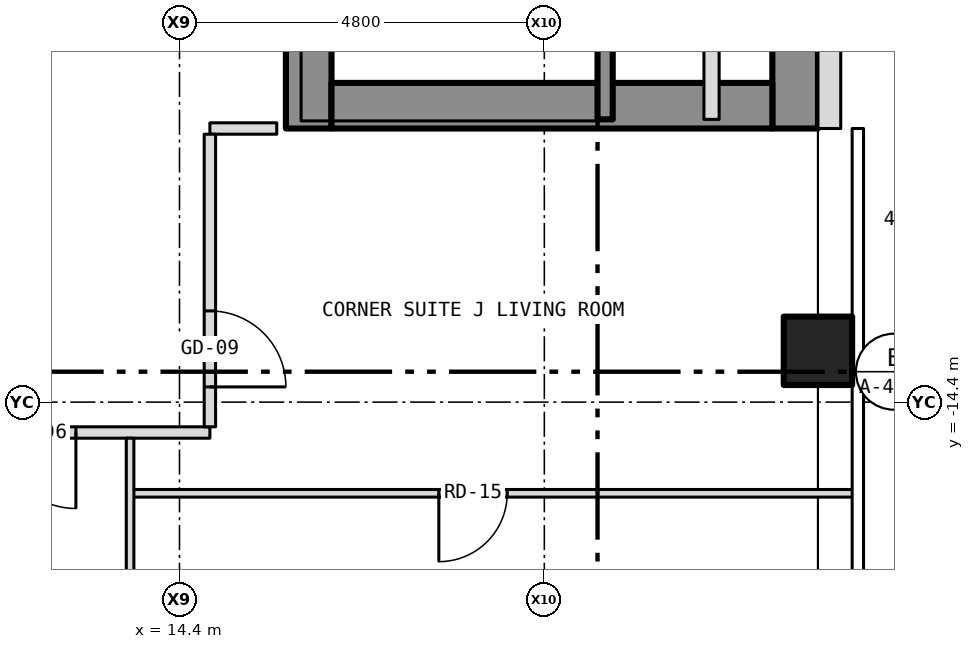
"""IFC4 building model, lengths in metres.
Left out: names, types, materials, properties, quantities, classifications, styles, units other than length and angle.
Written with IfcOpenShell. Run it as: python <this file> out.ifc"""

import sys

from ifc_helpers import new_model, si_unit, direction, frame, frame_2d, origin, origin_2d, place, context, subcontext, project, spatial, rectangle, hollow_rectangle, extrude, element, fill, save


model = new_model("IFC4")
c1 = context("Model", 3, precision=1e-05, world=origin(), true_north=direction((0.0, 1.0)))
c2 = subcontext(c1, "Body", "Model", "MODEL_VIEW")
j1 = project(units=[si_unit("LENGTHUNIT", "METRE"), si_unit("PLANEANGLEUNIT", "RADIAN")], contexts=[c1])
p1 = place(None, origin())
s1 = spatial("IfcSite", under=j1, at=p1, CompositionType="ELEMENT")
p2 = place(p1, origin())
s2 = spatial("IfcBuilding", under=s1, at=p2, CompositionType="ELEMENT")
p3 = place(p2, frame((0.0, 0.0, 103.0)))
s3 = spatial("IfcBuildingStorey", under=s2, at=p3, CompositionType="ELEMENT", Elevation=103.0)
p4 = place(p3, frame((22.8, -13.725, -0.15), z_axis=(0.0, 0.0, 1.0), x_axis=(1.0, 0.0, 0.0)))
e1 = element("IfcColumn", 1, at=p4, inside=s3, PredefinedType="COLUMN", context=c2, shape_type="SweptSolid", body=[
    extrude(hollow_rectangle(XDim=0.9, YDim=0.9, WallThickness=0.05, at=origin_2d()), origin(), (0.0, 0.0, 1.0), 3.5),
])
p5 = place(p3, frame((16.1, -10.8, 0.0), z_axis=(0.0, 0.0, 1.0), x_axis=(0.0, 1.0, 0.0)))
e2 = element("IfcWall", 2, at=p5, inside=s3, PredefinedType="SHEAR", context=c2, shape_type="SweptSolid", body=[
    extrude(rectangle(XDim=21.6, YDim=0.6, at=frame_2d((10.8, 0.0))), origin(), (0.0, 0.0, 1.0), 3.25),
])
p6 = place(p5, frame((9.4, 0.0, 0.0)))
e3 = element("IfcOpeningElement", 3, at=p6, cuts=e2, PredefinedType="OPENING", context=c2, shape_type="SweptSolid", body=[
    extrude(rectangle(XDim=1.1, YDim=2.1, at=frame_2d((0.55, 1.05))), frame((0.0, 0.312, 0.0), z_axis=(0.0, -1.0, 0.0), x_axis=(1.0, 0.0, 0.0)), (0.0, 0.0, 1.0), 0.624),
])
p7 = place(p5, frame((11.5, 0.0, 0.0)))
e4 = element("IfcOpeningElement", 4, at=p7, cuts=e2, PredefinedType="OPENING", context=c2, shape_type="SweptSolid", body=[
    extrude(rectangle(XDim=1.1, YDim=2.1, at=frame_2d((0.55, 1.05))), frame((0.0, 0.312, 0.0), z_axis=(0.0, -1.0, 0.0), x_axis=(1.0, 0.0, 0.0)), (0.0, 0.0, 1.0), 0.624),
])
p8 = place(p5, frame((13.6, 0.0, 0.0)))
e5 = element("IfcOpeningElement", 5, at=p8, cuts=e2, PredefinedType="OPENING", context=c2, shape_type="SweptSolid", body=[
    extrude(rectangle(XDim=1.1, YDim=2.1, at=frame_2d((0.55, 1.05))), frame((0.0, 0.312, 0.0), z_axis=(0.0, -1.0, 0.0), x_axis=(1.0, 0.0, 0.0)), (0.0, 0.0, 1.0), 0.624),
])
p9 = place(p5, frame((15.7, 0.0, 0.0)))
e6 = element("IfcOpeningElement", 6, at=p9, cuts=e2, PredefinedType="OPENING", context=c2, shape_type="SweptSolid", body=[
    extrude(rectangle(XDim=1.1, YDim=2.1, at=frame_2d((0.55, 1.05))), frame((0.0, 0.312, 0.0), z_axis=(0.0, -1.0, 0.0), x_axis=(1.0, 0.0, 0.0)), (0.0, 0.0, 1.0), 0.624),
])
p10 = place(p5, frame((17.8, 0.0, 0.0)))
e7 = element("IfcOpeningElement", 7, at=p10, cuts=e2, PredefinedType="OPENING", context=c2, shape_type="SweptSolid", body=[
    extrude(rectangle(XDim=1.1, YDim=2.1, at=frame_2d((0.55, 1.05))), frame((0.0, 0.312, 0.0), z_axis=(0.0, -1.0, 0.0), x_axis=(1.0, 0.0, 0.0)), (0.0, 0.0, 1.0), 0.624),
])
p11 = place(p5, frame((5.642, 0.0, 0.0)))
e8 = element("IfcOpeningElement", 8, at=p11, cuts=e2, PredefinedType="OPENING", context=c2, shape_type="SweptSolid", body=[
    extrude(rectangle(XDim=1.1, YDim=2.1, at=frame_2d((0.55, 1.05))), frame((0.0, 0.312, 0.0), z_axis=(0.0, -1.0, 0.0), x_axis=(1.0, 0.0, 0.0)), (0.0, 0.0, 1.0), 0.624),
])
p12 = place(p5, frame((7.5, 0.0, 0.0)))
e9 = element("IfcOpeningElement", 9, at=p12, cuts=e2, PredefinedType="OPENING", context=c2, shape_type="SweptSolid", body=[
    extrude(rectangle(XDim=1.1, YDim=2.1, at=frame_2d((0.55, 1.05))), frame((0.0, 0.312, 0.0), z_axis=(0.0, -1.0, 0.0), x_axis=(1.0, 0.0, 0.0)), (0.0, 0.0, 1.0), 0.624),
])
p13 = place(p3, frame((22.5, -10.8, 0.0), z_axis=(0.0, 0.0, 1.0), x_axis=(0.0, 1.0, 0.0)))
e10 = element("IfcWall", 10, at=p13, inside=s3, PredefinedType="SHEAR", context=c2, shape_type="SweptSolid", body=[
    extrude(rectangle(XDim=21.6, YDim=0.6, at=frame_2d((10.8, 0.0))), origin(), (0.0, 0.0, 1.0), 3.25),
])
p14 = place(p3, frame((16.4, -10.5, 0.0), z_axis=(0.0, 0.0, 1.0), x_axis=(1.0, 0.0, 0.0)))
e11 = element("IfcWall", 11, at=p14, inside=s3, PredefinedType="SHEAR", context=c2, shape_type="SweptSolid", body=[
    extrude(rectangle(XDim=5.8, YDim=0.6, at=frame_2d((2.9, 0.0))), origin(), (0.0, 0.0, 1.0), 3.25),
])
p15 = place(p3, frame((22.95, -10.8, 0.0), z_axis=(0.0, 0.0, 1.0), x_axis=(0.0, 1.0, 0.0)))
e12 = element("IfcWall", 12, at=p15, inside=s3, PredefinedType="SOLIDWALL", context=c2, shape_type="SweptSolid", body=[
    extrude(rectangle(XDim=21.6, YDim=0.3, at=frame_2d((10.8, 0.0))), origin(), (0.0, 0.0, 1.0), 3.5),
])
p16 = place(p15, frame((2.95, 0.0, 1.0)))
e13 = element("IfcOpeningElement", 13, at=p16, cuts=e12, PredefinedType="OPENING", context=c2, shape_type="SweptSolid", body=[
    extrude(rectangle(XDim=0.6, YDim=1.5, at=frame_2d((0.3, 0.75))), frame((0.0, 0.162, 0.0), z_axis=(0.0, -1.0, 0.0), x_axis=(1.0, 0.0, 0.0)), (0.0, 0.0, 1.0), 0.324),
])
p17 = place(p3, frame((13.75, -15.6, 0.0), z_axis=(0.0, 0.0, 1.0), x_axis=(1.0, 0.0, 0.0)))
e14 = element("IfcWall", 14, at=p17, inside=s3, PredefinedType="PARTITIONING", context=c2, shape_type="SweptSolid", body=[
    extrude(rectangle(XDim=9.53, YDim=0.1, at=frame_2d((4.765, 0.0))), origin(), (0.0, 0.0, 1.0), 3.35),
])
p18 = place(p17, frame((4.062, 0.0, 0.0)))
e15 = element("IfcOpeningElement", 15, at=p18, cuts=e14, PredefinedType="OPENING", context=c2, shape_type="SweptSolid", body=[
    extrude(rectangle(XDim=0.9, YDim=2.1, at=frame_2d((0.45, 1.05))), frame((0.0, 0.062, 0.0), z_axis=(0.0, -1.0, 0.0), x_axis=(1.0, 0.0, 0.0)), (0.0, 0.0, 1.0), 0.124),
])
p19 = place(p3, frame((-14.8, -14.8, 0.0), z_axis=(0.0, 0.0, 1.0), x_axis=(1.0, 0.0, 0.0)))
e16 = element("IfcWall", 16, at=p19, inside=s3, PredefinedType="PARTITIONING", context=c2, shape_type="SweptSolid", body=[
    extrude(rectangle(XDim=29.6, YDim=0.15, at=frame_2d((14.8, 0.0))), origin(), (0.0, 0.0, 1.0), 3.35),
])
p20 = place(p19, frame((2.634, 0.0, 0.0)))
e17 = element("IfcOpeningElement", 17, at=p20, cuts=e16, PredefinedType="OPENING", context=c2, shape_type="SweptSolid", body=[
    extrude(rectangle(XDim=1.0, YDim=2.1, at=frame_2d((0.5, 1.05))), frame((0.0, 0.087, 0.0), z_axis=(0.0, -1.0, 0.0), x_axis=(1.0, 0.0, 0.0)), (0.0, 0.0, 1.0), 0.174),
])
p21 = place(p19, frame((16.816, 0.0, 0.0)))
e18 = element("IfcOpeningElement", 18, at=p21, cuts=e16, PredefinedType="OPENING", context=c2, shape_type="SweptSolid", body=[
    extrude(rectangle(XDim=1.0, YDim=2.1, at=frame_2d((0.5, 1.05))), frame((0.0, 0.087, 0.0), z_axis=(0.0, -1.0, 0.0), x_axis=(1.0, 0.0, 0.0)), (0.0, 0.0, 1.0), 0.174),
])
p22 = place(p19, frame((22.263, 0.0, 0.0)))
e19 = element("IfcOpeningElement", 19, at=p22, cuts=e16, PredefinedType="OPENING", context=c2, shape_type="SweptSolid", body=[
    extrude(rectangle(XDim=1.0, YDim=2.1, at=frame_2d((0.5, 1.05))), frame((0.0, 0.087, 0.0), z_axis=(0.0, -1.0, 0.0), x_axis=(1.0, 0.0, 0.0)), (0.0, 0.0, 1.0), 0.174),
])
p23 = place(p19, frame((26.837, 0.0, 0.0)))
e20 = element("IfcOpeningElement", 20, at=p23, cuts=e16, PredefinedType="OPENING", context=c2, shape_type="SweptSolid", body=[
    extrude(rectangle(XDim=1.0, YDim=2.1, at=frame_2d((0.5, 1.05))), frame((0.0, 0.087, 0.0), z_axis=(0.0, -1.0, 0.0), x_axis=(1.0, 0.0, 0.0)), (0.0, 0.0, 1.0), 0.174),
])
p24 = place(p3, frame((14.8, -10.8, 0.0), z_axis=(0.0, 0.0, 1.0), x_axis=(1.0, 0.0, 0.0)))
e21 = element("IfcWall", 21, at=p24, inside=s3, PredefinedType="PARTITIONING", context=c2, shape_type="SweptSolid", body=[
    extrude(rectangle(XDim=0.88, YDim=0.15, at=frame_2d((0.44, 0.0))), origin(), (0.0, 0.0, 1.0), 3.35),
])
p25 = place(p3, frame((13.75, -22.68, 0.0), z_axis=(0.0, 0.0, 1.0), x_axis=(0.0, 1.0, 0.0)))
e22 = element("IfcWall", 22, at=p25, inside=s3, PredefinedType="PARTITIONING", context=c2, shape_type="SweptSolid", body=[
    extrude(rectangle(XDim=7.805, YDim=0.1, at=frame_2d((3.902, 0.0))), origin(), (0.0, 0.0, 1.0), 3.35),
])
p26 = place(p3, frame((14.8, -14.725, 0.0), z_axis=(0.0, 0.0, 1.0), x_axis=(0.0, 1.0, 0.0)))
e23 = element("IfcWall", 23, at=p26, inside=s3, PredefinedType="PARTITIONING", context=c2, shape_type="SweptSolid", body=[
    extrude(rectangle(XDim=3.85, YDim=0.15, at=frame_2d((1.925, 0.0))), origin(), (0.0, 0.0, 1.0), 3.35),
])
p27 = place(p26, frame((0.525, 0.0, 0.0)))
e24 = element("IfcOpeningElement", 24, at=p27, cuts=e23, PredefinedType="OPENING", context=c2, shape_type="SweptSolid", body=[
    extrude(rectangle(XDim=1.0, YDim=2.1, at=frame_2d((0.5, 1.05))), frame((0.0, 0.087, 0.0), z_axis=(0.0, -1.0, 0.0), x_axis=(1.0, 0.0, 0.0)), (0.0, 0.0, 1.0), 0.174),
])
p28 = place(p3, frame((20.0, -10.68, 0.0), z_axis=(0.0, 0.0, 1.0), x_axis=(0.0, 1.0, 0.0)))
e25 = element("IfcWall", 25, at=p28, inside=s3, PredefinedType="SHEAR", context=c2, shape_type="SweptSolid", body=[
    extrude(rectangle(XDim=6.98, YDim=0.2, at=frame_2d((3.49, 0.0))), origin(), (0.0, 0.0, 1.0), 3.25),
])
p29 = place(p3, frame((21.4, -10.68, 0.0), z_axis=(0.0, 0.0, 1.0), x_axis=(0.0, 1.0, 0.0)))
e26 = element("IfcWall", 26, at=p29, inside=s3, PredefinedType="PARTITIONING", context=c2, shape_type="SweptSolid", body=[
    extrude(rectangle(XDim=8.68, YDim=0.2, at=frame_2d((4.34, 0.0))), origin(), (0.0, 0.0, 1.0), 3.25),
])
p30 = place(p29, frame((3.88, 0.0, 0.0)))
e27 = element("IfcOpeningElement", 27, at=p30, cuts=e26, PredefinedType="OPENING", context=c2, shape_type="SweptSolid", body=[
    extrude(rectangle(XDim=0.9, YDim=2.1, at=frame_2d((0.45, 1.05))), frame((0.0, 0.112, 0.0), z_axis=(0.0, -1.0, 0.0), x_axis=(1.0, 0.0, 0.0)), (0.0, 0.0, 1.0), 0.224),
])
p31 = place(p23, origin())
e28 = element("IfcDoor", 28, at=p31, inside=s3, OperationType="SINGLE_SWING_RIGHT", PredefinedType="DOOR", context=c2, shape_type="SweptSolid", body=[
    extrude(rectangle(XDim=1.0, YDim=2.1, at=frame_2d((0.5, 1.05))), frame((0.0, 0.025, 0.0), z_axis=(0.0, -1.0, 0.0), x_axis=(1.0, 0.0, 0.0)), (0.0, 0.0, 1.0), 0.05),
])
fill(e20, e28)
p32 = place(p27, origin())
e29 = element("IfcDoor", 29, at=p32, inside=s3, OperationType="SINGLE_SWING_LEFT", PredefinedType="DOOR", context=c2, shape_type="SweptSolid", body=[
    extrude(rectangle(XDim=1.0, YDim=2.1, at=frame_2d((0.5, 1.05))), frame((0.0, 0.025, 0.0), z_axis=(0.0, -1.0, 0.0), x_axis=(1.0, 0.0, 0.0)), (0.0, 0.0, 1.0), 0.05),
])
fill(e24, e29)
p33 = place(p18, origin())
e30 = element("IfcDoor", 30, at=p33, inside=s3, OperationType="SINGLE_SWING_LEFT", PredefinedType="DOOR", context=c2, shape_type="SweptSolid", body=[
    extrude(rectangle(XDim=0.9, YDim=2.1, at=frame_2d((0.45, 1.05))), frame((0.0, 0.025, 0.0), z_axis=(0.0, -1.0, 0.0), x_axis=(1.0, 0.0, 0.0)), (0.0, 0.0, 1.0), 0.05),
])
fill(e15, e30)
save(model, sys.argv[1])
